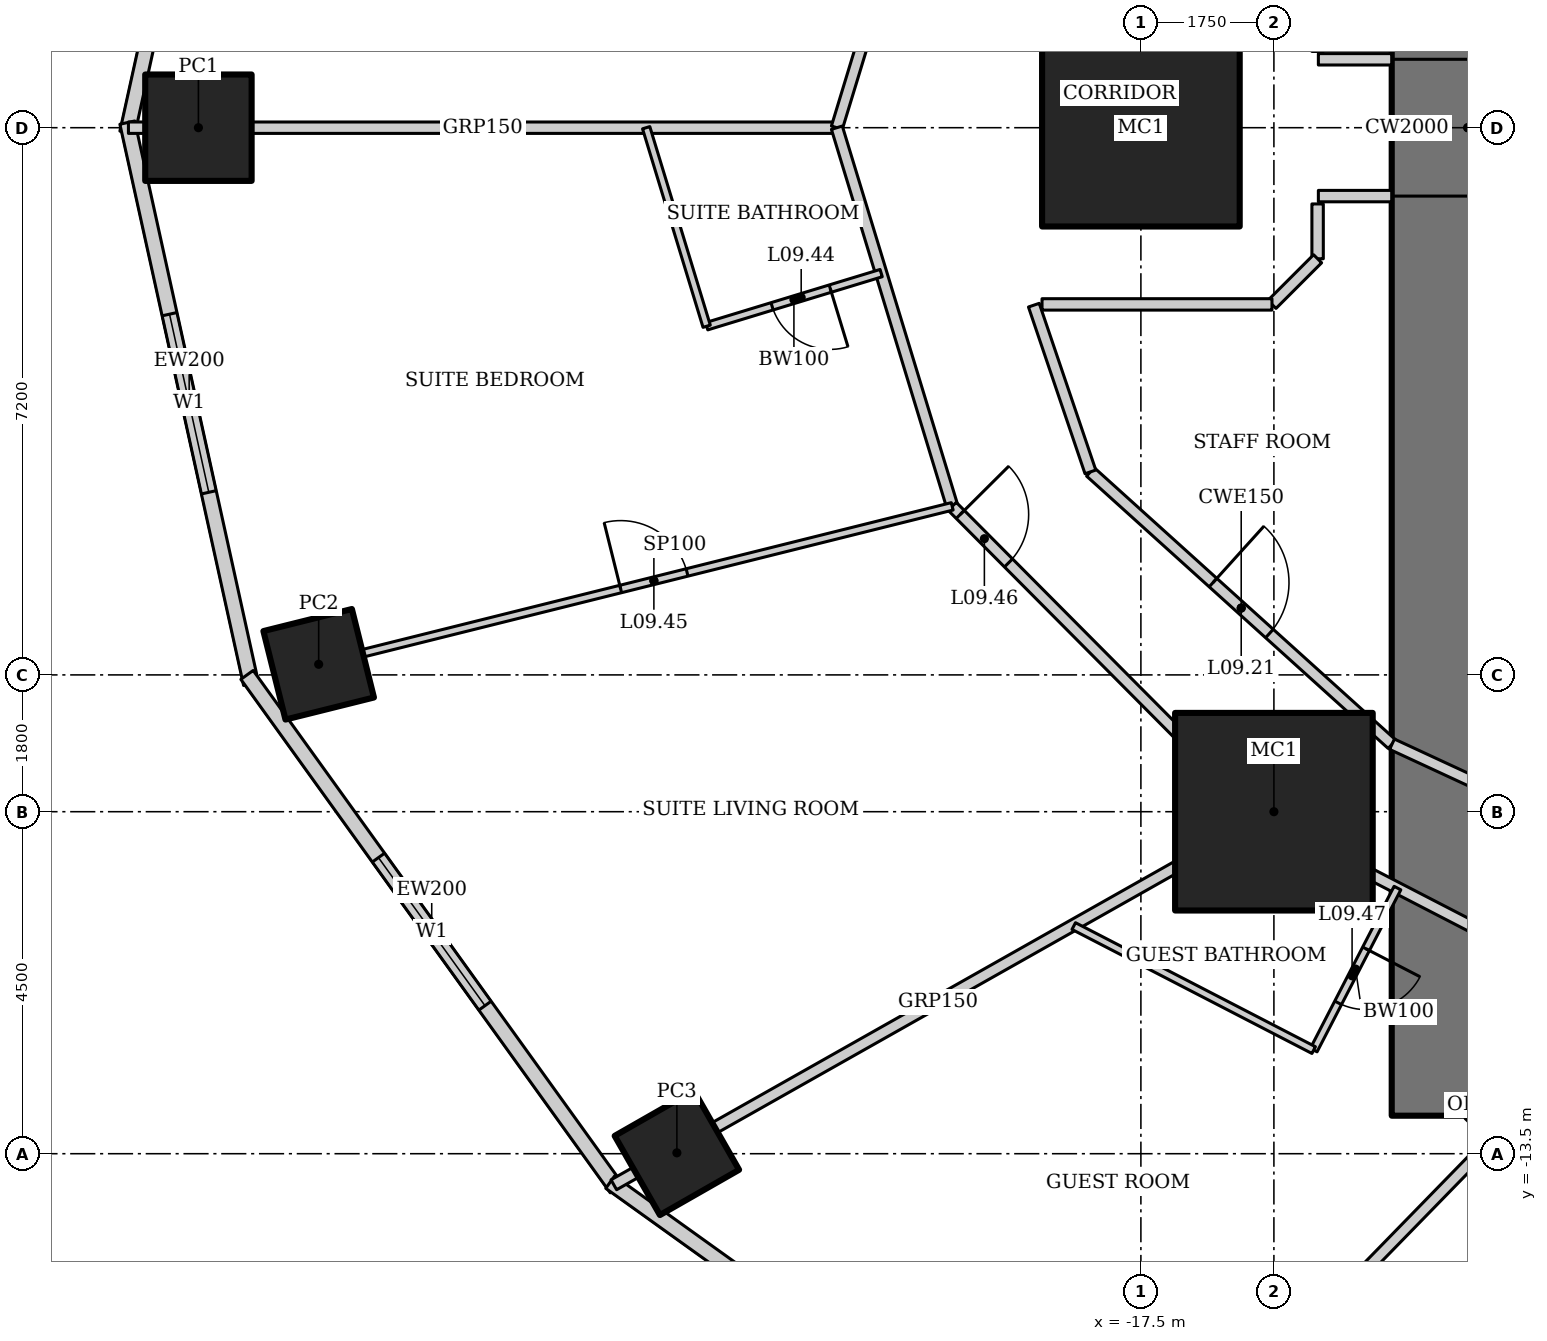
"""IFC4 building model, lengths in metres.
Left out: names, types, materials, properties, quantities, classifications, styles, units other than length and angle.
Written with IfcOpenShell. Run it as: python <this file> out.ifc"""

import sys

from ifc_helpers import new_model, si_unit, direction, frame, frame_2d, origin, origin_2d, place, context, subcontext, project, spatial, rectangle, hollow_rectangle, extrude, element, fill, save


model = new_model("IFC4")
c1 = context("Model", 3, precision=1e-05, world=origin(), true_north=direction((0.0, 1.0)))
c2 = subcontext(c1, "Body", "Model", "MODEL_VIEW")
j1 = project(units=[si_unit("LENGTHUNIT", "METRE"), si_unit("PLANEANGLEUNIT", "RADIAN")], contexts=[c1])
p1 = place(None, origin())
s1 = spatial("IfcSite", under=j1, at=p1, CompositionType="ELEMENT")
p2 = place(p1, origin())
s2 = spatial("IfcBuilding", under=s1, at=p2, CompositionType="ELEMENT")
p3 = place(p2, frame((0.0, 0.0, 47.8)))
s3 = spatial("IfcBuildingStorey", under=s2, at=p3, CompositionType="ELEMENT", Elevation=47.8)
for number, where, z_axis, x_axis in (
    (1, (-17.5, 0.0, 0.0), (0.0, 0.0, 1.0), (1.0, 0.0, 0.0)),
    (2, (-15.75, -9.0, 0.0), (0.0, 0.0, 1.0), (1.0, 0.0, 0.0)),
):
    element("IfcColumn", number, at=place(p3, frame(where, z_axis=z_axis, x_axis=x_axis)), inside=s3, PredefinedType="COLUMN", context=c2, shape_type="SweptSolid", body=[
        extrude(hollow_rectangle(XDim=2.6, YDim=2.6, WallThickness=0.13, at=origin_2d()), origin(), (0.0, 0.0, 1.0), 3.6),
    ])
p4 = place(p3, frame((-29.9, 0.0, 0.0), z_axis=(0.0, 0.0, 1.0), x_axis=(1.0, 0.0, 0.0)))
e3 = element("IfcColumn", 3, at=p4, inside=s3, PredefinedType="COLUMN", context=c2, shape_type="SweptSolid", body=[
    extrude(hollow_rectangle(XDim=1.4, YDim=1.4, WallThickness=0.1, at=origin_2d()), origin(), (0.0, 0.0, 1.0), 3.6),
])
p5 = place(p3, frame((-28.318, -7.06, 0.0), z_axis=(0.0, 0.0, 1.0), x_axis=(0.970295726276, 0.2419218956, 0.0)))
e4 = element("IfcColumn", 4, at=p5, inside=s3, PredefinedType="COLUMN", context=c2, shape_type="SweptSolid", body=[
    extrude(hollow_rectangle(XDim=1.2, YDim=1.2, WallThickness=0.1, at=origin_2d()), origin(), (0.0, 0.0, 1.0), 3.6),
])
p6 = place(p3, frame((-23.605, -13.489, 0.0), z_axis=(0.0, 0.0, 1.0), x_axis=(0.86824298017, 0.496139221777, 0.0)))
e5 = element("IfcColumn", 5, at=p6, inside=s3, PredefinedType="COLUMN", context=c2, shape_type="SweptSolid", body=[
    extrude(hollow_rectangle(XDim=1.2, YDim=1.2, WallThickness=0.12, at=origin_2d()), origin(), (0.0, 0.0, 1.0), 3.6),
])
p7 = place(p3, frame((-13.2, 13.0, 0.0), z_axis=(0.0, 0.0, 1.0), x_axis=(0.0, -1.0, 0.0)))
e6 = element("IfcWall", 6, at=p7, inside=s3, PredefinedType="SHEAR", context=c2, shape_type="SweptSolid", body=[
    extrude(rectangle(XDim=26.0, YDim=2.0, at=frame_2d((13.0, 0.0))), origin(), (0.0, 0.0, 1.0), 3.6),
])
p8 = place(p7, frame((12.1, 0.0, 0.0)))
e7 = element("IfcOpeningElement", 7, at=p8, cuts=e6, PredefinedType="OPENING", context=c2, shape_type="SweptSolid", body=[
    extrude(rectangle(XDim=1.8, YDim=2.1, at=frame_2d((0.9, 1.05))), frame((0.0, 1.01, 0.0), z_axis=(0.0, -1.0, 0.0), x_axis=(1.0, 0.0, 0.0)), (0.0, 0.0, 1.0), 2.02),
])
p9 = place(p3, frame((-29.208, 7.318, 0.0), z_axis=(0.0, 0.0, 1.0), x_axis=(-0.215238065514, -0.976561608478, 0.0)))
e8 = element("IfcWall", 8, at=p9, inside=s3, PredefinedType="SOLIDWALL", context=c2, shape_type="SweptSolid", body=[
    extrude(rectangle(XDim=7.562, YDim=0.2, at=frame_2d((3.781, 0.0))), origin(), (0.0, 0.0, 1.0), 3.45),
])
p10 = place(p9, frame((2.581, 0.0, 0.5)))
e9 = element("IfcOpeningElement", 9, at=p10, cuts=e8, PredefinedType="OPENING", context=c2, shape_type="SweptSolid", body=[
    extrude(rectangle(XDim=2.4, YDim=2.2, at=frame_2d((1.2, 1.1))), frame((0.0, 0.11, 0.0), z_axis=(0.0, -1.0, 0.0), x_axis=(1.0, 0.0, 0.0)), (0.0, 0.0, 1.0), 0.22),
])
p11 = place(p3, frame((-30.835, 0.067, 0.0), z_axis=(0.0, 0.0, 1.0), x_axis=(0.215238065514, -0.976561608478, 0.0)))
e10 = element("IfcWall", 10, at=p11, inside=s3, PredefinedType="SOLIDWALL", context=c2, shape_type="SweptSolid", body=[
    extrude(rectangle(XDim=7.562, YDim=0.2, at=frame_2d((3.781, 0.0))), origin(), (0.0, 0.0, 1.0), 3.45),
])
p12 = place(p11, frame((2.581, 0.0, 0.5)))
e11 = element("IfcOpeningElement", 11, at=p12, cuts=e10, PredefinedType="OPENING", context=c2, shape_type="SweptSolid", body=[
    extrude(rectangle(XDim=2.4, YDim=2.2, at=frame_2d((1.2, 1.1))), frame((0.0, 0.11, 0.0), z_axis=(0.0, -1.0, 0.0), x_axis=(1.0, 0.0, 0.0)), (0.0, 0.0, 1.0), 0.22),
])
p13 = place(p3, frame((-29.26, -7.2, 0.0), z_axis=(0.0, 0.0, 1.0), x_axis=(0.583937613703, -0.811798536155, 0.0)))
e12 = element("IfcWall", 12, at=p13, inside=s3, PredefinedType="SOLIDWALL", context=c2, shape_type="SweptSolid", body=[
    extrude(rectangle(XDim=8.323, YDim=0.2, at=frame_2d((4.162, 0.0))), origin(), (0.0, 0.0, 1.0), 3.45),
])
p14 = place(p13, frame((2.961, 0.0, 0.5)))
e13 = element("IfcOpeningElement", 13, at=p14, cuts=e12, PredefinedType="OPENING", context=c2, shape_type="SweptSolid", body=[
    extrude(rectangle(XDim=2.4, YDim=2.2, at=frame_2d((1.2, 1.1))), frame((0.0, 0.11, 0.0), z_axis=(0.0, -1.0, 0.0), x_axis=(1.0, 0.0, 0.0)), (0.0, 0.0, 1.0), 0.22),
])
p15 = place(p3, frame((-24.482, -13.875, 0.0), z_axis=(0.0, 0.0, 1.0), x_axis=(0.812791321576, -0.582554948112, 0.0)))
e14 = element("IfcWall", 14, at=p15, inside=s3, PredefinedType="SOLIDWALL", context=c2, shape_type="SweptSolid", body=[
    extrude(rectangle(XDim=8.063, YDim=0.2, at=frame_2d((4.032, 0.0))), origin(), (0.0, 0.0, 1.0), 3.45),
])
p16 = place(p15, frame((2.832, 0.0, 0.5)))
e15 = element("IfcOpeningElement", 15, at=p16, cuts=e14, PredefinedType="OPENING", context=c2, shape_type="SweptSolid", body=[
    extrude(rectangle(XDim=2.4, YDim=2.2, at=frame_2d((1.2, 1.1))), frame((0.0, 0.11, 0.0), z_axis=(0.0, -1.0, 0.0), x_axis=(1.0, 0.0, 0.0)), (0.0, 0.0, 1.0), 0.22),
])
p17 = place(p3, frame((-30.821, 0.0, 0.0), z_axis=(0.0, 0.0, 1.0), x_axis=(1.0, 0.0, 0.0)))
e16 = element("IfcWall", 16, at=p17, inside=s3, PredefinedType="PARTITIONING", context=c2, shape_type="SweptSolid", body=[
    extrude(rectangle(XDim=9.321, YDim=0.15, at=frame_2d((4.66, 0.0))), origin(), (0.0, 0.0, 1.0), 2.528),
])
p18 = place(p3, frame((-24.435, -13.909, 0.0), z_axis=(0.0, 0.0, 1.0), x_axis=(0.870612006791, 0.491970256856, 0.0)))
e17 = element("IfcWall", 17, at=p18, inside=s3, PredefinedType="PARTITIONING", context=c2, shape_type="SweptSolid", body=[
    extrude(rectangle(XDim=9.802, YDim=0.15, at=frame_2d((4.901, 0.0))), origin(), (0.0, 0.0, 1.0), 2.693),
])
p19 = place(p3, frame((-17.97, -18.542, 0.0), z_axis=(0.0, 0.0, 1.0), x_axis=(0.698095013805, 0.71600513385, 0.0)))
e18 = element("IfcWall", 18, at=p19, inside=s3, PredefinedType="PARTITIONING", context=c2, shape_type="SweptSolid", body=[
    extrude(rectangle(XDim=9.774, YDim=0.15, at=frame_2d((4.887, 0.0))), origin(), (0.0, 0.0, 1.0), 2.528),
])
p20 = place(p3, frame((-19.982, 4.982, 0.0), z_axis=(0.0, 0.0, 1.0), x_axis=(-0.291383581394, -0.95660629754, 0.0)))
e19 = element("IfcWall", 19, at=p20, inside=s3, PredefinedType="PARTITIONING", context=c2, shape_type="SweptSolid", body=[
    extrude(rectangle(XDim=5.208, YDim=0.15, at=frame_2d((2.604, 0.0))), origin(), (0.0, 0.0, 1.0), 3.45),
])
p21 = place(p20, frame((0.15, 0.0, 0.0)))
e20 = element("IfcOpeningElement", 20, at=p21, cuts=e19, PredefinedType="OPENING", context=c2, shape_type="SweptSolid", body=[
    extrude(rectangle(XDim=0.9, YDim=2.1, at=frame_2d((0.45, 1.05))), frame((0.0, 0.085, 0.0), z_axis=(0.0, -1.0, 0.0), x_axis=(1.0, 0.0, 0.0)), (0.0, 0.0, 1.0), 0.17),
])
p22 = place(p3, frame((-21.5, 0.0, 0.0), z_axis=(0.0, 0.0, 1.0), x_axis=(0.291383581394, -0.95660629754, 0.0)))
e21 = element("IfcWall", 21, at=p22, inside=s3, PredefinedType="PARTITIONING", context=c2, shape_type="SweptSolid", body=[
    extrude(rectangle(XDim=5.208, YDim=0.15, at=frame_2d((2.604, 0.0))), origin(), (0.0, 0.0, 1.0), 3.45),
])
p23 = place(p3, frame((-19.982, -4.982, 0.0), z_axis=(0.0, 0.0, 1.0), x_axis=(0.705121546414, -0.709086457904, 0.0)))
e22 = element("IfcWall", 22, at=p23, inside=s3, PredefinedType="PARTITIONING", context=c2, shape_type="SweptSolid", body=[
    extrude(rectangle(XDim=5.788, YDim=0.15, at=frame_2d((2.894, 0.0))), origin(), (0.0, 0.0, 1.0), 3.45),
])
p24 = place(p23, frame((0.15, 0.0, 0.0)))
e23 = element("IfcOpeningElement", 23, at=p24, cuts=e22, PredefinedType="OPENING", context=c2, shape_type="SweptSolid", body=[
    extrude(rectangle(XDim=0.9, YDim=2.1, at=frame_2d((0.45, 1.05))), frame((0.0, 0.085, 0.0), z_axis=(0.0, -1.0, 0.0), x_axis=(1.0, 0.0, 0.0)), (0.0, 0.0, 1.0), 0.17),
])
p25 = place(p3, frame((-15.901, -9.086, 0.0), z_axis=(0.0, 0.0, 1.0), x_axis=(0.888333171507, -0.459199495209, 0.0)))
e24 = element("IfcWall", 24, at=p25, inside=s3, PredefinedType="PARTITIONING", context=c2, shape_type="SweptSolid", body=[
    extrude(rectangle(XDim=5.351, YDim=0.15, at=frame_2d((2.676, 0.0))), origin(), (0.0, 0.0, 1.0), 3.45),
])
p26 = place(p25, frame((4.301, 0.0, 0.0)))
e25 = element("IfcOpeningElement", 25, at=p26, cuts=e24, PredefinedType="OPENING", context=c2, shape_type="SweptSolid", body=[
    extrude(rectangle(XDim=0.9, YDim=2.1, at=frame_2d((0.45, 1.05))), frame((0.0, 0.085, 0.0), z_axis=(0.0, -1.0, 0.0), x_axis=(1.0, 0.0, 0.0)), (0.0, 0.0, 1.0), 0.17),
])
p27 = place(p3, frame((-18.164, -4.529, 0.0), z_axis=(0.0, 0.0, 1.0), x_axis=(0.742194222, -0.670184852731, 0.0)))
e26 = element("IfcWall", 26, at=p27, inside=s3, PredefinedType="PARTITIONING", context=c2, shape_type="SweptSolid", body=[
    extrude(rectangle(XDim=5.347, YDim=0.15, at=frame_2d((2.673, 0.0))), origin(), (0.0, 0.0, 1.0), 3.45),
])
p28 = place(p27, frame((2.173, 0.0, 0.0)))
e27 = element("IfcOpeningElement", 27, at=p28, cuts=e26, PredefinedType="OPENING", context=c2, shape_type="SweptSolid", body=[
    extrude(rectangle(XDim=1.0, YDim=2.1, at=frame_2d((0.5, 1.05))), frame((0.0, 0.085, 0.0), z_axis=(0.0, -1.0, 0.0), x_axis=(1.0, 0.0, 0.0)), (0.0, 0.0, 1.0), 0.17),
])
p29 = place(p3, frame((-14.196, -8.112, 0.0), z_axis=(0.0, 0.0, 1.0), x_axis=(0.907279653965, -0.420527798727, 0.0)))
e28 = element("IfcWall", 28, at=p29, inside=s3, PredefinedType="PARTITIONING", context=c2, shape_type="SweptSolid", body=[
    extrude(rectangle(XDim=4.844, YDim=0.15, at=frame_2d((2.422, 0.0))), origin(), (0.0, 0.0, 1.0), 3.45),
])
p30 = place(p3, frame((-20.917, -1.913, 0.0), z_axis=(0.0, 0.0, 1.0), x_axis=(-0.956591303063, -0.291432803411, 0.0)))
e29 = element("IfcWall", 29, at=p30, inside=s3, PredefinedType="PARTITIONING", context=c2, shape_type="SweptSolid", body=[
    extrude(rectangle(XDim=2.4, YDim=0.1, at=frame_2d((1.2, 0.0))), origin(), (0.0, 0.0, 1.0), 3.45),
])
p31 = place(p30, frame((0.7, 0.0, 0.0)))
e30 = element("IfcOpeningElement", 30, at=p31, cuts=e29, PredefinedType="OPENING", context=c2, shape_type="SweptSolid", body=[
    extrude(rectangle(XDim=0.8, YDim=2.1, at=frame_2d((0.4, 1.05))), frame((0.0, 0.06, 0.0), z_axis=(0.0, -1.0, 0.0), x_axis=(1.0, 0.0, 0.0)), (0.0, 0.0, 1.0), 0.12),
])
p32 = place(p3, frame((-23.213, -2.613, 0.0), z_axis=(0.0, 0.0, 1.0), x_axis=(-0.291339473488, 0.956619731757, 0.0)))
e31 = element("IfcWall", 31, at=p32, inside=s3, PredefinedType="PARTITIONING", context=c2, shape_type="SweptSolid", body=[
    extrude(rectangle(XDim=2.731, YDim=0.1, at=frame_2d((1.365, 0.0))), origin(), (0.0, 0.0, 1.0), 3.45),
])
p33 = place(p3, frame((-27.833, -6.939, 0.0), z_axis=(0.0, 0.0, 1.0), x_axis=(0.97029673161, 0.24191786339, 0.0)))
e32 = element("IfcWall", 32, at=p33, inside=s3, PredefinedType="PARTITIONING", context=c2, shape_type="SweptSolid", body=[
    extrude(rectangle(XDim=8.091, YDim=0.1, at=frame_2d((4.045, 0.0))), origin(), (0.0, 0.0, 1.0), 2.332),
])
p34 = place(p33, frame((3.595, 0.0, 0.0)))
e33 = element("IfcOpeningElement", 33, at=p34, cuts=e32, PredefinedType="OPENING", context=c2, shape_type="SweptSolid", body=[
    extrude(rectangle(XDim=0.9, YDim=2.1, at=frame_2d((0.45, 1.05))), frame((0.0, 0.06, 0.0), z_axis=(0.0, -1.0, 0.0), x_axis=(1.0, 0.0, 0.0)), (0.0, 0.0, 1.0), 0.12),
])
p35 = place(p3, frame((-14.125, -10.005, 0.0), z_axis=(0.0, 0.0, 1.0), x_axis=(-0.459218106657, -0.888323550582, 0.0)))
e34 = element("IfcWall", 34, at=p35, inside=s3, PredefinedType="PARTITIONING", context=c2, shape_type="SweptSolid", body=[
    extrude(rectangle(XDim=2.4, YDim=0.1, at=frame_2d((1.2, 0.0))), origin(), (0.0, 0.0, 1.0), 3.45),
])
p36 = place(p35, frame((0.9, 0.0, 0.0)))
e35 = element("IfcOpeningElement", 35, at=p36, cuts=e34, PredefinedType="OPENING", context=c2, shape_type="SweptSolid", body=[
    extrude(rectangle(XDim=0.8, YDim=2.1, at=frame_2d((0.4, 1.05))), frame((0.0, 0.06, 0.0), z_axis=(0.0, -1.0, 0.0), x_axis=(1.0, 0.0, 0.0)), (0.0, 0.0, 1.0), 0.12),
])
p37 = place(p3, frame((-15.227, -12.137, 0.0), z_axis=(0.0, 0.0, 1.0), x_axis=(-0.888342312029, 0.459181812204, 0.0)))
e36 = element("IfcWall", 36, at=p37, inside=s3, PredefinedType="PARTITIONING", context=c2, shape_type="SweptSolid", body=[
    extrude(rectangle(XDim=3.554, YDim=0.1, at=frame_2d((1.777, 0.0))), origin(), (0.0, 0.0, 1.0), 3.45),
])
p38 = place(p3, frame((-13.2, -13.0, 0.0), z_axis=(0.0, 0.0, 1.0), x_axis=(0.715946243145, -0.698155410296, 0.0)))
e37 = element("IfcWall", 37, at=p38, inside=s3, PredefinedType="PARTITIONING", context=c2, shape_type="SweptSolid", body=[
    extrude(rectangle(XDim=0.453, YDim=0.1, at=frame_2d((0.227, 0.0))), origin(), (0.0, 0.0, 1.0), 3.45),
])
p39 = place(p3, frame((-18.908, -2.335, 0.0), z_axis=(0.0, 0.0, 1.0), x_axis=(0.321124194945, -0.947037090837, 0.0)))
e38 = element("IfcWall", 38, at=p39, inside=s3, PredefinedType="PARTITIONING", context=c2, shape_type="SweptSolid", body=[
    extrude(rectangle(XDim=2.317, YDim=0.15, at=frame_2d((1.158, 0.0))), origin(), (0.0, 0.0, 1.0), 3.45),
])
for number, where, z_axis, x_axis in (
    (39, (-14.2, -0.9, 0.0), (0.0, 0.0, 1.0), (-1.0, 0.0, 0.0)),
    (40, (-14.2, 0.9, 0.0), (0.0, 0.0, 1.0), (-1.0, 0.0, 0.0)),
):
    element("IfcWall", number, at=place(p3, frame(where, z_axis=z_axis, x_axis=x_axis)), inside=s3, PredefinedType="PARTITIONING", context=c2, shape_type="SweptSolid", body=[
        extrude(rectangle(XDim=0.965, YDim=0.15, at=frame_2d((0.482, 0.0))), origin(), (0.0, 0.0, 1.0), 3.45),
    ])
p40 = place(p3, frame((-15.175, -1.003, 0.0), z_axis=(0.0, 0.0, 1.0), x_axis=(0.0, -1.0, 0.0)))
e41 = element("IfcWall", 41, at=p40, inside=s3, PredefinedType="PARTITIONING", context=c2, shape_type="SweptSolid", body=[
    extrude(rectangle(XDim=0.721, YDim=0.15, at=frame_2d((0.361, 0.0))), origin(), (0.0, 0.0, 1.0), 3.45),
])
p41 = place(p3, frame((-15.175, -1.725, 0.0), z_axis=(0.0, 0.0, 1.0), x_axis=(-0.707106781187, -0.707106781187, 0.0)))
e42 = element("IfcWall", 42, at=p41, inside=s3, PredefinedType="PARTITIONING", context=c2, shape_type="SweptSolid", body=[
    extrude(rectangle(XDim=0.849, YDim=0.15, at=frame_2d((0.425, 0.0))), origin(), (0.0, 0.0, 1.0), 3.45),
])
p42 = place(p3, frame((-15.775, -2.325, 0.0), z_axis=(0.0, 0.0, 1.0), x_axis=(-1.0, 0.0, 0.0)))
e43 = element("IfcWall", 43, at=p42, inside=s3, PredefinedType="PARTITIONING", context=c2, shape_type="SweptSolid", body=[
    extrude(rectangle(XDim=3.025, YDim=0.15, at=frame_2d((1.513, 0.0))), origin(), (0.0, 0.0, 1.0), 3.45),
])
p43 = place(p12, origin())
e44 = element("IfcWindow", 44, at=p43, inside=s3, PartitioningType="SINGLE_PANEL", PredefinedType="WINDOW", context=c2, shape_type="SweptSolid", body=[
    extrude(rectangle(XDim=2.4, YDim=2.2, at=frame_2d((1.2, 1.1))), frame((0.0, 0.03, 0.0), z_axis=(0.0, -1.0, 0.0), x_axis=(1.0, 0.0, 0.0)), (0.0, 0.0, 1.0), 0.06),
])
fill(e11, e44)
p44 = place(p14, origin())
e45 = element("IfcWindow", 45, at=p44, inside=s3, PartitioningType="SINGLE_PANEL", PredefinedType="WINDOW", context=c2, shape_type="SweptSolid", body=[
    extrude(rectangle(XDim=2.4, YDim=2.2, at=frame_2d((1.2, 1.1))), frame((0.0, 0.03, 0.0), z_axis=(0.0, -1.0, 0.0), x_axis=(1.0, 0.0, 0.0)), (0.0, 0.0, 1.0), 0.06),
])
fill(e13, e45)
p45 = place(p8, origin())
e46 = element("IfcDoor", 46, at=p45, inside=s3, OperationType="DOUBLE_DOOR_DOUBLE_SWING", PredefinedType="DOOR", context=c2, shape_type="SweptSolid", body=[
    extrude(rectangle(XDim=1.8, YDim=2.1, at=frame_2d((0.9, 1.05))), frame((0.0, 0.025, 0.0), z_axis=(0.0, -1.0, 0.0), x_axis=(1.0, 0.0, 0.0)), (0.0, 0.0, 1.0), 0.05),
])
fill(e7, e46)
p46 = place(p28, origin())
e47 = element("IfcDoor", 47, at=p46, inside=s3, OperationType="SINGLE_SWING_LEFT", PredefinedType="DOOR", context=c2, shape_type="SweptSolid", body=[
    extrude(rectangle(XDim=1.0, YDim=2.1, at=frame_2d((0.5, 1.05))), frame((0.0, 0.025, 0.0), z_axis=(0.0, -1.0, 0.0), x_axis=(1.0, 0.0, 0.0)), (0.0, 0.0, 1.0), 0.05),
])
fill(e27, e47)
p47 = place(p31, origin())
e48 = element("IfcDoor", 48, at=p47, inside=s3, OperationType="SINGLE_SWING_LEFT", PredefinedType="DOOR", context=c2, shape_type="SweptSolid", body=[
    extrude(rectangle(XDim=0.8, YDim=2.1, at=frame_2d((0.4, 1.05))), frame((0.0, 0.025, 0.0), z_axis=(0.0, -1.0, 0.0), x_axis=(1.0, 0.0, 0.0)), (0.0, 0.0, 1.0), 0.05),
])
fill(e30, e48)
p48 = place(p34, origin())
e49 = element("IfcDoor", 49, at=p48, inside=s3, OperationType="SINGLE_SWING_LEFT", PredefinedType="DOOR", context=c2, shape_type="SweptSolid", body=[
    extrude(rectangle(XDim=0.9, YDim=2.1, at=frame_2d((0.45, 1.05))), frame((0.0, 0.025, 0.0), z_axis=(0.0, -1.0, 0.0), x_axis=(1.0, 0.0, 0.0)), (0.0, 0.0, 1.0), 0.05),
])
fill(e33, e49)
p49 = place(p24, origin())
e50 = element("IfcDoor", 50, at=p49, inside=s3, OperationType="SINGLE_SWING_LEFT", PredefinedType="DOOR", context=c2, shape_type="SweptSolid", body=[
    extrude(rectangle(XDim=0.9, YDim=2.1, at=frame_2d((0.45, 1.05))), frame((0.0, 0.025, 0.0), z_axis=(0.0, -1.0, 0.0), x_axis=(1.0, 0.0, 0.0)), (0.0, 0.0, 1.0), 0.05),
])
fill(e23, e50)
p50 = place(p36, origin())
e51 = element("IfcDoor", 51, at=p50, inside=s3, OperationType="SINGLE_SWING_LEFT", PredefinedType="DOOR", context=c2, shape_type="SweptSolid", body=[
    extrude(rectangle(XDim=0.8, YDim=2.1, at=frame_2d((0.4, 1.05))), frame((0.0, 0.025, 0.0), z_axis=(0.0, -1.0, 0.0), x_axis=(1.0, 0.0, 0.0)), (0.0, 0.0, 1.0), 0.05),
])
fill(e35, e51)
save(model, sys.argv[1])
